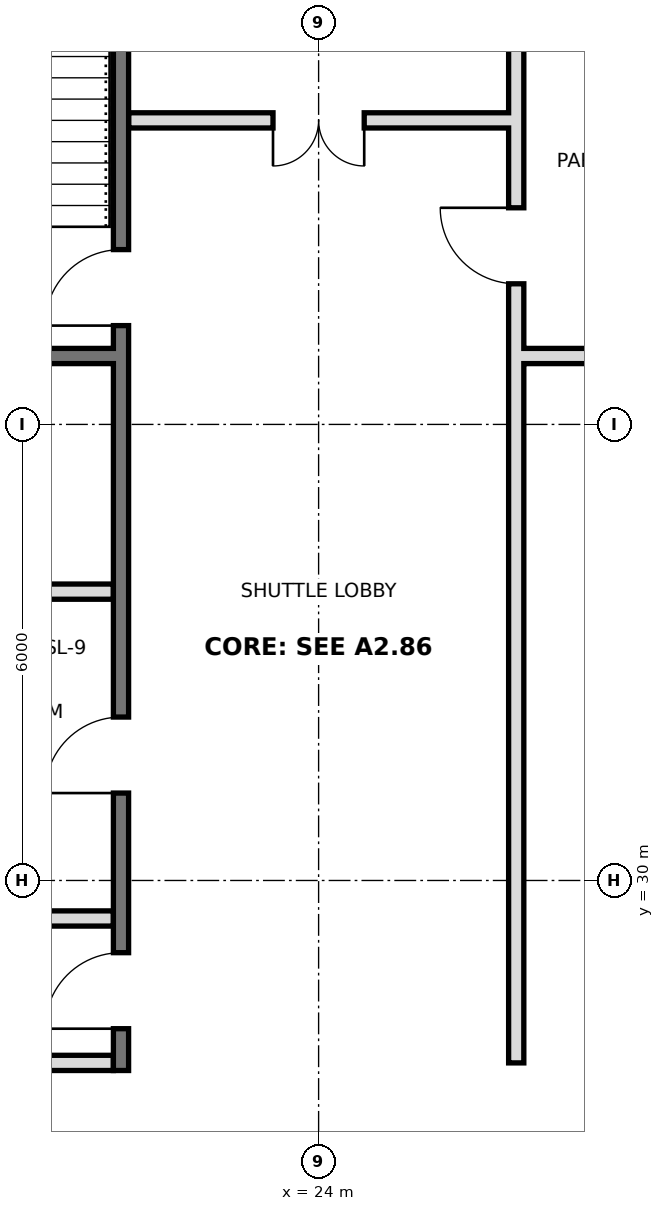
"""IFC4 building model, lengths in metres.
Left out: names, types, materials, properties, quantities, classifications, styles, units other than length and angle.
Written with IfcOpenShell. Run it as: python <this file> out.ifc"""

import sys

from ifc_helpers import new_model, si_unit, direction, frame, frame_2d, origin, place, context, subcontext, project, spatial, rectangle, extrude, element, fill, save


model = new_model("IFC4")
c1 = context("Model", 3, precision=1e-05, world=origin(), true_north=direction((0.0, 1.0)))
c2 = subcontext(c1, "Body", "Model", "MODEL_VIEW")
j1 = project(units=[si_unit("LENGTHUNIT", "METRE"), si_unit("PLANEANGLEUNIT", "RADIAN")], contexts=[c1])
p1 = place(None, origin())
s1 = spatial("IfcSite", under=j1, at=p1, CompositionType="ELEMENT")
p2 = place(p1, origin())
s2 = spatial("IfcBuilding", under=s1, at=p2, CompositionType="ELEMENT")
p3 = place(p2, frame((0.0, 0.0, 345.8)))
s3 = spatial("IfcBuildingStorey", under=s2, at=p3, CompositionType="ELEMENT", Elevation=345.8)
p4 = place(p3, frame((21.4, 27.5, 0.0), z_axis=(0.0, 0.0, 1.0), x_axis=(0.0, 1.0, 0.0)))
e1 = element("IfcWall", 1, at=p4, inside=s3, PredefinedType="SOLIDWALL", context=c2, shape_type="SweptSolid", body=[
    extrude(rectangle(XDim=17.5, YDim=0.2, at=frame_2d((8.75, 0.0))), origin(), (0.0, 0.0, 1.0), 3.75),
])
p5 = place(p4, frame((0.55, 0.0, 0.0)))
e2 = element("IfcOpeningElement", 2, at=p5, cuts=e1, PredefinedType="OPENING", context=c2, shape_type="SweptSolid", body=[
    extrude(rectangle(XDim=1.0, YDim=2.1, at=frame_2d((0.5, 1.05))), frame((0.0, 0.11, 0.0), z_axis=(0.0, -1.0, 0.0), x_axis=(1.0, 0.0, 0.0)), (0.0, 0.0, 1.0), 0.22),
])
p6 = place(p4, frame((3.65, 0.0, 0.0)))
e3 = element("IfcOpeningElement", 3, at=p6, cuts=e1, PredefinedType="OPENING", context=c2, shape_type="SweptSolid", body=[
    extrude(rectangle(XDim=1.0, YDim=2.1, at=frame_2d((0.5, 1.05))), frame((0.0, 0.11, 0.0), z_axis=(0.0, -1.0, 0.0), x_axis=(1.0, 0.0, 0.0)), (0.0, 0.0, 1.0), 0.22),
])
p7 = place(p4, frame((9.8, 0.0, 0.0)))
e4 = element("IfcOpeningElement", 4, at=p7, cuts=e1, PredefinedType="OPENING", context=c2, shape_type="SweptSolid", body=[
    extrude(rectangle(XDim=1.0, YDim=2.1, at=frame_2d((0.5, 1.05))), frame((0.0, 0.11, 0.0), z_axis=(0.0, -1.0, 0.0), x_axis=(1.0, 0.0, 0.0)), (0.0, 0.0, 1.0), 0.22),
])
p8 = place(p3, frame((26.6, 27.6, 0.0), z_axis=(0.0, 0.0, 1.0), x_axis=(0.0, 1.0, 0.0)))
e5 = element("IfcWall", 5, at=p8, inside=s3, PredefinedType="PARTITIONING", context=c2, shape_type="SweptSolid", body=[
    extrude(rectangle(XDim=17.4, YDim=0.2, at=frame_2d((8.7, 0.0))), origin(), (0.0, 0.0, 1.0), 3.75),
])
p9 = place(p8, frame((10.25, 0.0, 0.0)))
e6 = element("IfcOpeningElement", 6, at=p9, cuts=e5, PredefinedType="OPENING", context=c2, shape_type="SweptSolid", body=[
    extrude(rectangle(XDim=1.0, YDim=2.1, at=frame_2d((0.5, 1.05))), frame((0.0, 0.11, 0.0), z_axis=(0.0, -1.0, 0.0), x_axis=(1.0, 0.0, 0.0)), (0.0, 0.0, 1.0), 0.22),
])
p10 = place(p8, frame((15.375, 0.0, 0.0)))
e7 = element("IfcOpeningElement", 7, at=p10, cuts=e5, PredefinedType="OPENING", context=c2, shape_type="SweptSolid", body=[
    extrude(rectangle(XDim=1.0, YDim=2.1, at=frame_2d((0.5, 1.05))), frame((0.0, 0.11, 0.0), z_axis=(0.0, -1.0, 0.0), x_axis=(1.0, 0.0, 0.0)), (0.0, 0.0, 1.0), 0.22),
])
for number, where, z_axis, x_axis in (
    (8, (18.6, 27.6, 0.0), (0.0, 0.0, 1.0), (1.0, 0.0, 0.0)),
    (9, (18.6, 29.5, 0.0), (0.0, 0.0, 1.0), (1.0, 0.0, 0.0)),
    (10, (18.6, 33.8, 0.0), (0.0, 0.0, 1.0), (1.0, 0.0, 0.0)),
):
    element("IfcWall", number, at=place(p3, frame(where, z_axis=z_axis, x_axis=x_axis)), inside=s3, PredefinedType="PARTITIONING", context=c2, shape_type="SweptSolid", body=[
        extrude(rectangle(XDim=2.7, YDim=0.2, at=frame_2d((1.35, 0.0))), origin(), (0.0, 0.0, 1.0), 3.75),
    ])
p11 = place(p3, frame((18.6, 36.9, 0.0), z_axis=(0.0, 0.0, 1.0), x_axis=(1.0, 0.0, 0.0)))
e11 = element("IfcWall", 11, at=p11, inside=s3, PredefinedType="SOLIDWALL", context=c2, shape_type="SweptSolid", body=[
    extrude(rectangle(XDim=2.7, YDim=0.2, at=frame_2d((1.35, 0.0))), origin(), (0.0, 0.0, 1.0), 3.75),
])
p12 = place(p3, frame((26.7, 36.9, 0.0), z_axis=(0.0, 0.0, 1.0), x_axis=(1.0, 0.0, 0.0)))
e12 = element("IfcWall", 12, at=p12, inside=s3, PredefinedType="PARTITIONING", context=c2, shape_type="SweptSolid", body=[
    extrude(rectangle(XDim=2.7, YDim=0.2, at=frame_2d((1.35, 0.0))), origin(), (0.0, 0.0, 1.0), 3.75),
])
p13 = place(p3, frame((21.5, 40.0, 0.0), z_axis=(0.0, 0.0, 1.0), x_axis=(1.0, 0.0, 0.0)))
e13 = element("IfcWall", 13, at=p13, inside=s3, PredefinedType="PARTITIONING", context=c2, shape_type="SweptSolid", body=[
    extrude(rectangle(XDim=5.0, YDim=0.2, at=frame_2d((2.5, 0.0))), origin(), (0.0, 0.0, 1.0), 3.75),
])
p14 = place(p13, frame((1.9, 0.0, 0.0)))
e14 = element("IfcOpeningElement", 14, at=p14, cuts=e13, PredefinedType="OPENING", context=c2, shape_type="SweptSolid", body=[
    extrude(rectangle(XDim=1.2, YDim=2.1, at=frame_2d((0.6, 1.05))), frame((0.0, 0.11, 0.0), z_axis=(0.0, -1.0, 0.0), x_axis=(1.0, 0.0, 0.0)), (0.0, 0.0, 1.0), 0.22),
])
p15 = place(p14, frame((1.2, 0.0, 0.0), z_axis=(0.0, 0.0, 1.0), x_axis=(-1.0, 0.0, 0.0)))
e15 = element("IfcDoor", 15, at=p15, inside=s3, OperationType="DOUBLE_DOOR_SINGLE_SWING", PredefinedType="DOOR", context=c2, shape_type="SweptSolid", body=[
    extrude(rectangle(XDim=1.2, YDim=2.1, at=frame_2d((0.6, 1.05))), frame((0.0, 0.025, 0.0), z_axis=(0.0, -1.0, 0.0), x_axis=(1.0, 0.0, 0.0)), (0.0, 0.0, 1.0), 0.05),
])
fill(e14, e15)
p16 = place(p5, origin())
e16 = element("IfcDoor", 16, at=p16, inside=s3, OperationType="SINGLE_SWING_LEFT", PredefinedType="DOOR", context=c2, shape_type="SweptSolid", body=[
    extrude(rectangle(XDim=1.0, YDim=2.1, at=frame_2d((0.5, 1.05))), frame((0.0, 0.025, 0.0), z_axis=(0.0, -1.0, 0.0), x_axis=(1.0, 0.0, 0.0)), (0.0, 0.0, 1.0), 0.05),
])
fill(e2, e16)
p17 = place(p6, origin())
e17 = element("IfcDoor", 17, at=p17, inside=s3, OperationType="SINGLE_SWING_LEFT", PredefinedType="DOOR", context=c2, shape_type="SweptSolid", body=[
    extrude(rectangle(XDim=1.0, YDim=2.1, at=frame_2d((0.5, 1.05))), frame((0.0, 0.025, 0.0), z_axis=(0.0, -1.0, 0.0), x_axis=(1.0, 0.0, 0.0)), (0.0, 0.0, 1.0), 0.05),
])
fill(e3, e17)
p18 = place(p7, origin())
e18 = element("IfcDoor", 18, at=p18, inside=s3, OperationType="SINGLE_SWING_LEFT", PredefinedType="DOOR", context=c2, shape_type="SweptSolid", body=[
    extrude(rectangle(XDim=1.0, YDim=2.1, at=frame_2d((0.5, 1.05))), frame((0.0, 0.025, 0.0), z_axis=(0.0, -1.0, 0.0), x_axis=(1.0, 0.0, 0.0)), (0.0, 0.0, 1.0), 0.05),
])
fill(e4, e18)
p19 = place(p9, frame((1.0, 0.0, 0.0), z_axis=(0.0, 0.0, 1.0), x_axis=(-1.0, 0.0, 0.0)))
e19 = element("IfcDoor", 19, at=p19, inside=s3, OperationType="SINGLE_SWING_LEFT", PredefinedType="DOOR", context=c2, shape_type="SweptSolid", body=[
    extrude(rectangle(XDim=1.0, YDim=2.1, at=frame_2d((0.5, 1.05))), frame((0.0, 0.025, 0.0), z_axis=(0.0, -1.0, 0.0), x_axis=(1.0, 0.0, 0.0)), (0.0, 0.0, 1.0), 0.05),
])
fill(e6, e19)
save(model, sys.argv[1])
